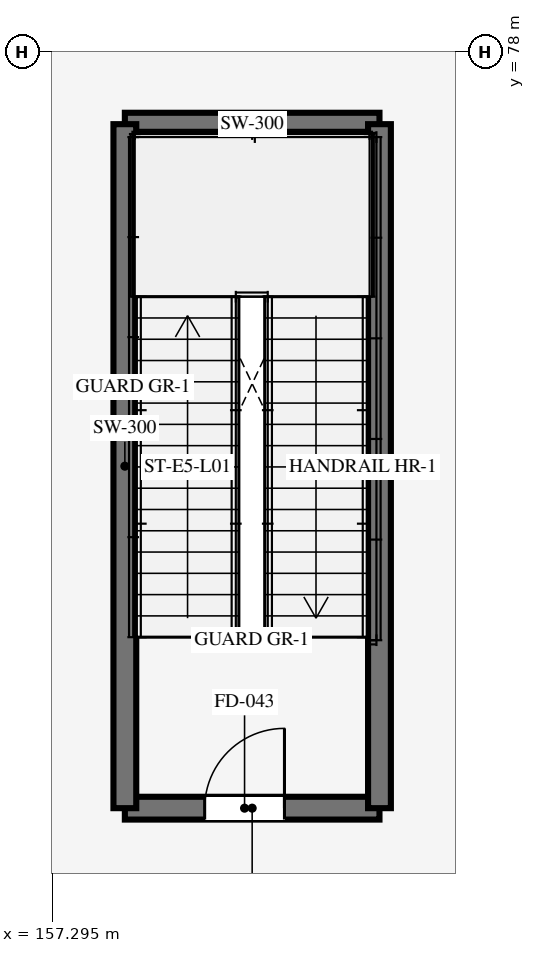
"""IFC4 building model, lengths in metres.
Left out: names, types, materials, properties, quantities, classifications, styles, units other than length and angle.
Written with IfcOpenShell. Run it as: python <this file> out.ifc"""

import sys

from ifc_helpers import new_model, si_unit, direction, frame, frame_2d, origin, place, context, subcontext, project, spatial, rectangle, extrude, element, fill, save


model = new_model("IFC4")
c1 = context("Model", 3, precision=1e-05, world=origin(), true_north=direction((0.0, 1.0)))
c2 = subcontext(c1, "Body", "Model", "MODEL_VIEW")
j1 = project(units=[si_unit("LENGTHUNIT", "METRE"), si_unit("PLANEANGLEUNIT", "RADIAN")], contexts=[c1])
p1 = place(None, origin())
s1 = spatial("IfcSite", under=j1, at=p1, CompositionType="ELEMENT")
p2 = place(p1, origin())
s2 = spatial("IfcBuilding", under=s1, at=p2, CompositionType="ELEMENT")
p3 = place(p2, frame((0.0, 0.0, 5.4)))
s3 = spatial("IfcBuildingStorey", under=s2, at=p3, CompositionType="ELEMENT", Elevation=5.4)
p4 = place(p3, frame((158.25, 68.05, 0.0), z_axis=(0.0, 0.0, 1.0), x_axis=(1.0, 0.0, 0.0)))
e1 = element("IfcWall", 1, at=p4, inside=s3, PredefinedType="SHEAR", context=c2, shape_type="SweptSolid", body=[
    extrude(rectangle(XDim=3.35, YDim=0.3, at=frame_2d((1.675, 0.0))), origin(), (0.0, 0.0, 1.0), 4.78),
])
p5 = place(p4, frame((1.05, 0.0, 0.0)))
e2 = element("IfcOpeningElement", 2, at=p5, cuts=e1, PredefinedType="OPENING", context=c2, shape_type="SweptSolid", body=[
    extrude(rectangle(XDim=1.05, YDim=2.15, at=frame_2d((0.525, 1.075))), frame((0.0, 0.16, 0.0), z_axis=(0.0, -1.0, 0.0), x_axis=(1.0, 0.0, 0.0)), (0.0, 0.0, 1.0), 0.32),
])
p6 = place(p3, frame((158.25, 77.05, 0.0), z_axis=(0.0, 0.0, 1.0), x_axis=(1.0, 0.0, 0.0)))
e3 = element("IfcWall", 3, at=p6, inside=s3, PredefinedType="SHEAR", context=c2, shape_type="SweptSolid", body=[
    extrude(rectangle(XDim=3.35, YDim=0.3, at=frame_2d((1.675, 0.0))), origin(), (0.0, 0.0, 1.0), 4.78),
])
for number, where, z_axis, x_axis in (
    (4, (158.25, 68.05, 0.0), (0.0, 0.0, 1.0), (0.0, 1.0, 0.0)),
    (5, (161.6, 68.05, 0.0), (0.0, 0.0, 1.0), (0.0, 1.0, 0.0)),
):
    element("IfcWall", number, at=place(p3, frame(where, z_axis=z_axis, x_axis=x_axis)), inside=s3, PredefinedType="SHEAR", context=c2, shape_type="SweptSolid", body=[
        extrude(rectangle(XDim=9.0, YDim=0.3, at=frame_2d((4.5, 0.0))), origin(), (0.0, 0.0, 1.0), 4.78),
    ])
p7 = place(p5, origin())
e6 = element("IfcDoor", 6, at=p7, inside=s3, OperationType="SINGLE_SWING_RIGHT", PredefinedType="DOOR", context=c2, shape_type="SweptSolid", body=[
    extrude(rectangle(XDim=1.05, YDim=2.15, at=frame_2d((0.525, 1.075))), frame((0.0, 0.025, 0.0), z_axis=(0.0, -1.0, 0.0), x_axis=(1.0, 0.0, 0.0)), (0.0, 0.0, 1.0), 0.05),
])
fill(e2, e6)
save(model, sys.argv[1])
